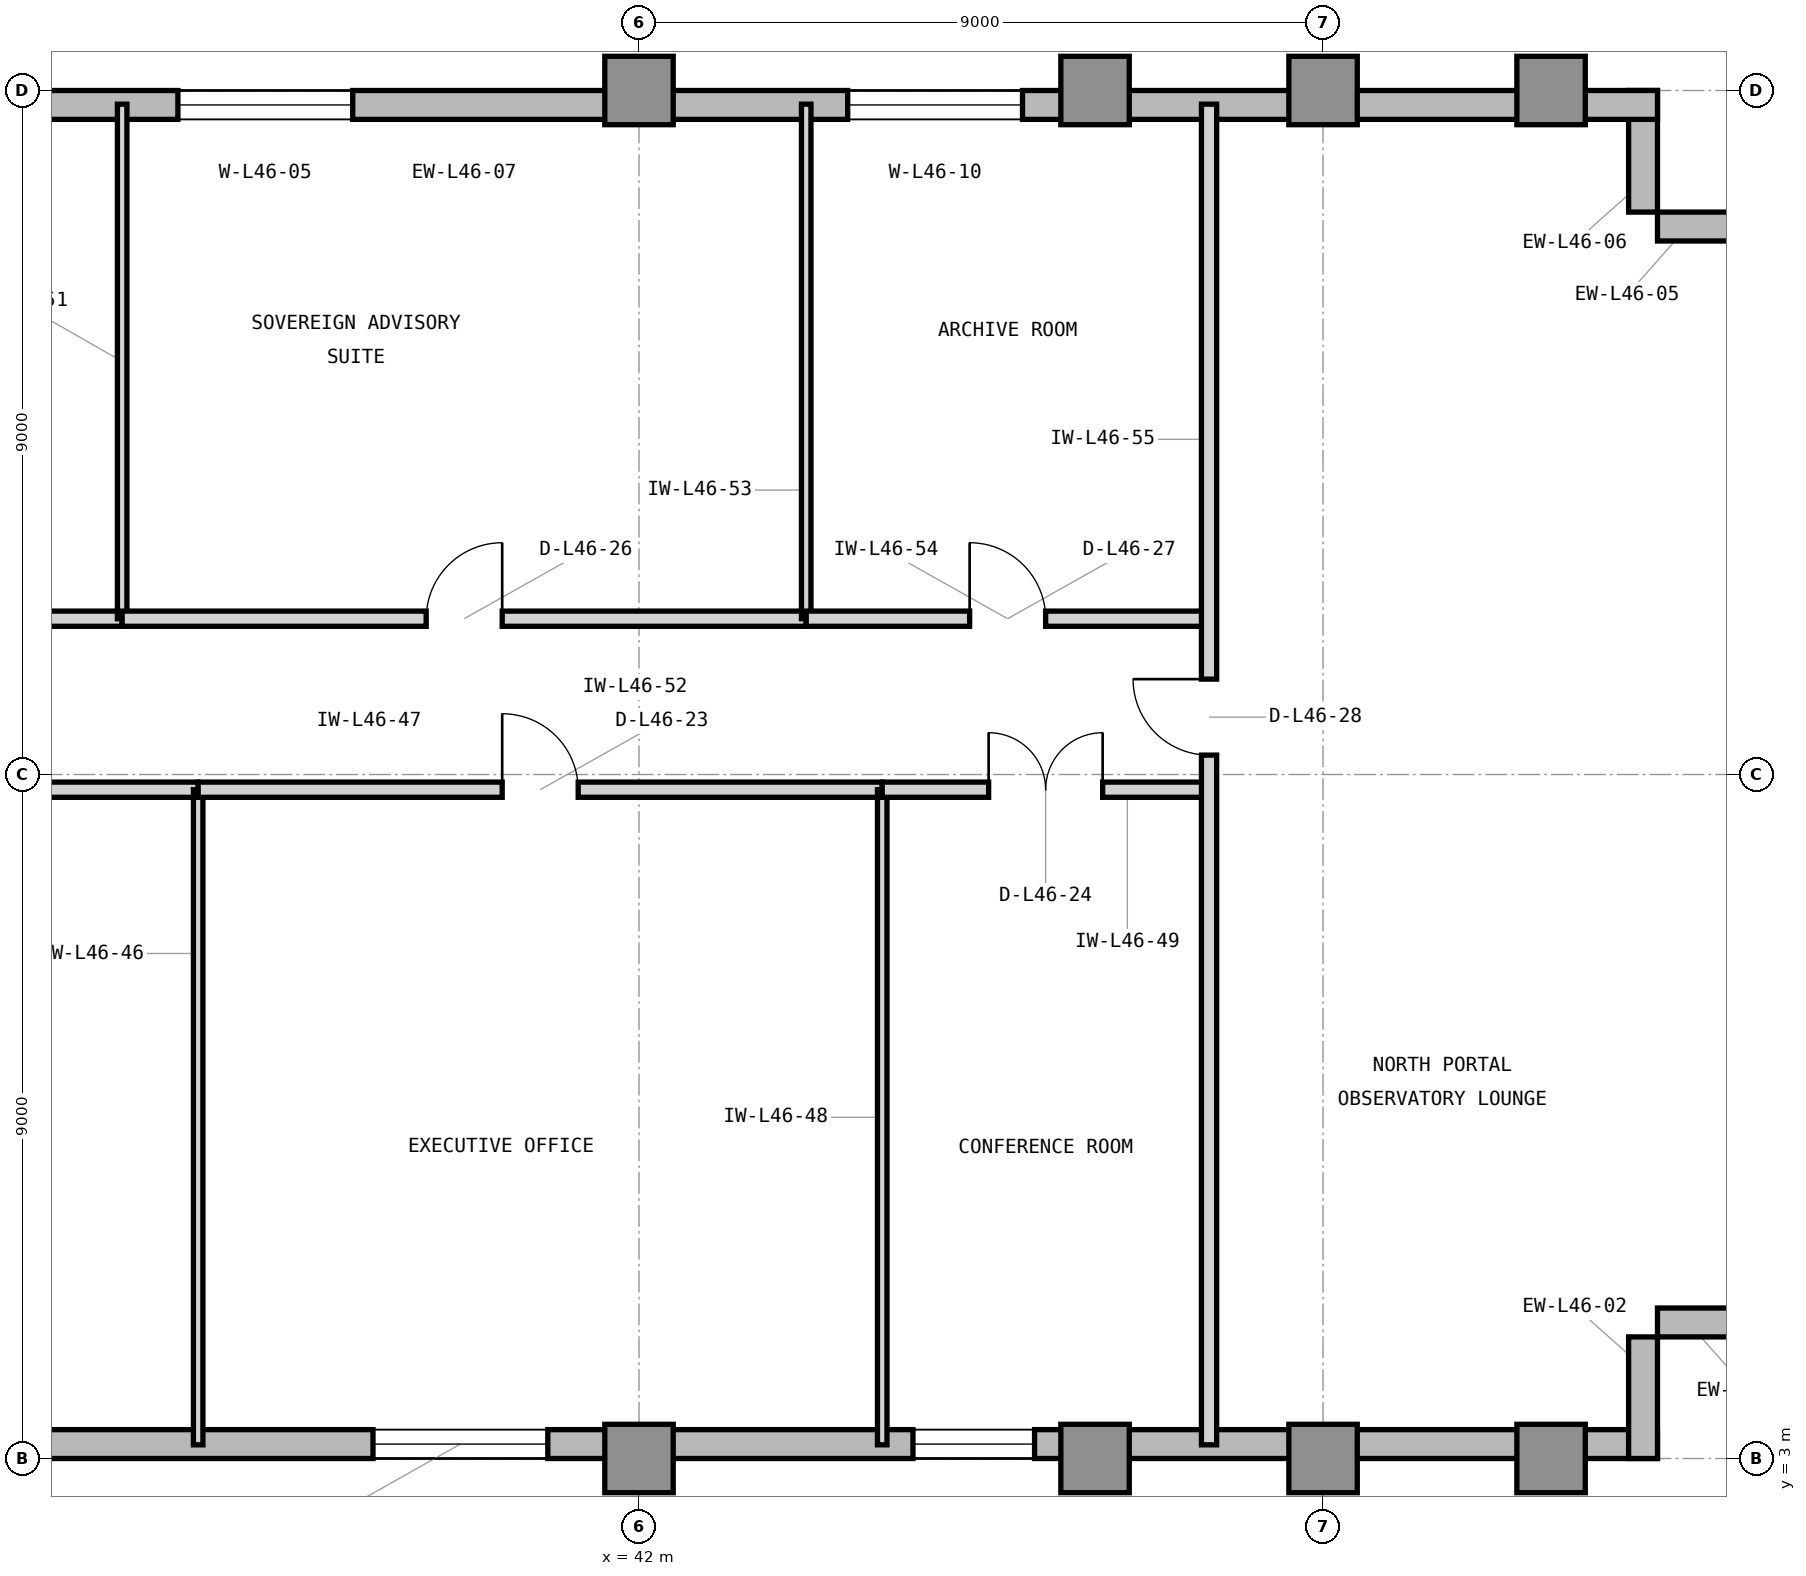
"""IFC4 building model, lengths in metres.
Left out: names, types, materials, properties, quantities, classifications, styles, units other than length and angle.
Written with IfcOpenShell. Run it as: python <this file> out.ifc"""

import sys

from ifc_helpers import new_model, si_unit, direction, frame, frame_2d, origin, origin_2d, place, context, subcontext, project, spatial, rectangle, extrude, element, fill, save


model = new_model("IFC4")
c1 = context("Model", 3, precision=1e-05, world=origin(), true_north=direction((0.0, 1.0)))
c2 = subcontext(c1, "Body", "Model", "MODEL_VIEW")
j1 = project(units=[si_unit("LENGTHUNIT", "METRE"), si_unit("PLANEANGLEUNIT", "RADIAN")], contexts=[c1])
p1 = place(None, origin())
s1 = spatial("IfcSite", under=j1, at=p1, CompositionType="ELEMENT")
p2 = place(p1, origin())
s2 = spatial("IfcBuilding", under=s1, at=p2, CompositionType="ELEMENT")
p3 = place(p2, frame((0.0, 0.0, 191.7)))
s3 = spatial("IfcBuildingStorey", under=s2, at=p3, CompositionType="ELEMENT", Elevation=191.7)
for number, where, z_axis, x_axis in (
    (1, (42.0, 3.0, 0.0), (0.0, 0.0, 1.0), (1.0, 0.0, 0.0)),
    (2, (42.0, 21.0, 0.0), (0.0, 0.0, 1.0), (1.0, 0.0, 0.0)),
    (3, (48.0, 3.0, 0.0), (0.0, 0.0, 1.0), (1.0, 0.0, 0.0)),
    (4, (48.0, 21.0, 0.0), (0.0, 0.0, 1.0), (1.0, 0.0, 0.0)),
    (5, (51.0, 3.0, 0.0), (0.0, 0.0, 1.0), (1.0, 0.0, 0.0)),
    (6, (51.0, 21.0, 0.0), (0.0, 0.0, 1.0), (1.0, 0.0, 0.0)),
    (7, (54.0, 3.0, 0.0), (0.0, 0.0, 1.0), (1.0, 0.0, 0.0)),
    (8, (54.0, 21.0, 0.0), (0.0, 0.0, 1.0), (1.0, 0.0, 0.0)),
):
    element("IfcColumn", number, at=place(p3, frame(where, z_axis=z_axis, x_axis=x_axis)), inside=s3, PredefinedType="COLUMN", context=c2, shape_type="SweptSolid", body=[
        extrude(rectangle(XDim=0.9, YDim=0.9, at=origin_2d()), origin(), (0.0, 0.0, 1.0), 3.9),
    ])
p4 = place(p3, frame((23.9, 3.19, 0.0), z_axis=(0.0, 0.0, 1.0), x_axis=(1.0, 0.0, 0.0)))
e9 = element("IfcWall", 9, at=p4, inside=s3, PredefinedType="STANDARD", context=c2, shape_type="SweptSolid", body=[
    extrude(rectangle(XDim=31.5, YDim=0.38, at=frame_2d((15.75, 0.0))), origin(), (0.0, 0.0, 1.0), 3.7),
])
p5 = place(p4, frame((5.6, 0.0, 0.9)))
e10 = element("IfcOpeningElement", 10, at=p5, cuts=e9, PredefinedType="OPENING", context=c2, shape_type="SweptSolid", body=[
    extrude(rectangle(XDim=2.3, YDim=2.2, at=frame_2d((1.15, 1.1))), frame((0.0, 0.2, 0.0), z_axis=(0.0, -1.0, 0.0), x_axis=(1.0, 0.0, 0.0)), (0.0, 0.0, 1.0), 0.4),
])
p6 = place(p4, frame((14.6, 0.0, 0.9)))
e11 = element("IfcOpeningElement", 11, at=p6, cuts=e9, PredefinedType="OPENING", context=c2, shape_type="SweptSolid", body=[
    extrude(rectangle(XDim=2.3, YDim=2.2, at=frame_2d((1.15, 1.1))), frame((0.0, 0.2, 0.0), z_axis=(0.0, -1.0, 0.0), x_axis=(1.0, 0.0, 0.0)), (0.0, 0.0, 1.0), 0.4),
])
p7 = place(p4, frame((0.9, 0.0, 0.9)))
e12 = element("IfcOpeningElement", 12, at=p7, cuts=e9, PredefinedType="OPENING", context=c2, shape_type="SweptSolid", body=[
    extrude(rectangle(XDim=1.6, YDim=2.2, at=frame_2d((0.8, 1.1))), frame((0.0, 0.2, 0.0), z_axis=(0.0, -1.0, 0.0), x_axis=(1.0, 0.0, 0.0)), (0.0, 0.0, 1.0), 0.4),
])
p8 = place(p4, frame((21.704, 0.0, 0.9)))
e13 = element("IfcOpeningElement", 13, at=p8, cuts=e9, PredefinedType="OPENING", context=c2, shape_type="SweptSolid", body=[
    extrude(rectangle(XDim=1.6, YDim=2.2, at=frame_2d((0.8, 1.1))), frame((0.0, 0.2, 0.0), z_axis=(0.0, -1.0, 0.0), x_axis=(1.0, 0.0, 0.0)), (0.0, 0.0, 1.0), 0.4),
])
for number, where, z_axis, x_axis in (
    (14, (55.21, 3.0, 0.0), (0.0, 0.0, 1.0), (0.0, 1.0, 0.0)),
    (15, (55.4, 4.79, 0.0), (0.0, 0.0, 1.0), (1.0, 0.0, 0.0)),
    (16, (57.0, 19.21, 0.0), (0.0, 0.0, 1.0), (-1.0, 0.0, 0.0)),
    (17, (55.21, 19.4, 0.0), (0.0, 0.0, 1.0), (0.0, 1.0, 0.0)),
):
    element("IfcWall", number, at=place(p3, frame(where, z_axis=z_axis, x_axis=x_axis)), inside=s3, PredefinedType="STANDARD", context=c2, shape_type="SweptSolid", body=[
        extrude(rectangle(XDim=1.6, YDim=0.38, at=frame_2d((0.8, 0.0))), origin(), (0.0, 0.0, 1.0), 3.7),
    ])
p9 = place(p3, frame((55.4, 20.81, 0.0), z_axis=(0.0, 0.0, 1.0), x_axis=(-1.0, 0.0, 0.0)))
e18 = element("IfcWall", 18, at=p9, inside=s3, PredefinedType="STANDARD", context=c2, shape_type="SweptSolid", body=[
    extrude(rectangle(XDim=31.4, YDim=0.38, at=frame_2d((15.7, 0.0))), origin(), (0.0, 0.0, 1.0), 3.7),
])
p10 = place(p9, frame((17.167, 0.0, 0.9)))
e19 = element("IfcOpeningElement", 19, at=p10, cuts=e18, PredefinedType="OPENING", context=c2, shape_type="SweptSolid", body=[
    extrude(rectangle(XDim=2.3, YDim=2.2, at=frame_2d((1.15, 1.1))), frame((0.0, 0.2, 0.0), z_axis=(0.0, -1.0, 0.0), x_axis=(1.0, 0.0, 0.0)), (0.0, 0.0, 1.0), 0.4),
])
p11 = place(p9, frame((29.034, 0.0, 0.9)))
e20 = element("IfcOpeningElement", 20, at=p11, cuts=e18, PredefinedType="OPENING", context=c2, shape_type="SweptSolid", body=[
    extrude(rectangle(XDim=1.6, YDim=2.2, at=frame_2d((0.8, 1.1))), frame((0.0, 0.2, 0.0), z_axis=(0.0, -1.0, 0.0), x_axis=(1.0, 0.0, 0.0)), (0.0, 0.0, 1.0), 0.4),
])
p12 = place(p9, frame((8.354, 0.0, 0.9)))
e21 = element("IfcOpeningElement", 21, at=p12, cuts=e18, PredefinedType="OPENING", context=c2, shape_type="SweptSolid", body=[
    extrude(rectangle(XDim=2.3, YDim=2.2, at=frame_2d((1.15, 1.1))), frame((0.0, 0.2, 0.0), z_axis=(0.0, -1.0, 0.0), x_axis=(1.0, 0.0, 0.0)), (0.0, 0.0, 1.0), 0.4),
])
p13 = place(p3, frame((26.7, 11.8, 0.0), z_axis=(0.0, 0.0, 1.0), x_axis=(1.0, 0.0, 0.0)))
e22 = element("IfcWall", 22, at=p13, inside=s3, PredefinedType="PARTITIONING", context=c2, shape_type="SweptSolid", body=[
    extrude(rectangle(XDim=9.5, YDim=0.2, at=frame_2d((4.75, 0.0))), origin(), (0.0, 0.0, 1.0), 3.69),
])
p14 = place(p13, frame((4.25, 0.0, 0.0)))
e23 = element("IfcOpeningElement", 23, at=p14, cuts=e22, PredefinedType="OPENING", context=c2, shape_type="SweptSolid", body=[
    extrude(rectangle(XDim=1.0, YDim=2.15, at=frame_2d((0.5, 1.075))), frame((0.0, 0.11, 0.0), z_axis=(0.0, -1.0, 0.0), x_axis=(1.0, 0.0, 0.0)), (0.0, 0.0, 1.0), 0.22),
])
p15 = place(p3, frame((36.2, 3.18, 0.0), z_axis=(0.0, 0.0, 1.0), x_axis=(0.0, 1.0, 0.0)))
e24 = element("IfcWall", 24, at=p15, inside=s3, PredefinedType="PARTITIONING", context=c2, shape_type="SweptSolid", body=[
    extrude(rectangle(XDim=8.62, YDim=0.125, at=frame_2d((4.31, 0.0))), origin(), (0.0, 0.0, 1.0), 3.69),
])
p16 = place(p3, frame((36.2, 11.8, 0.0), z_axis=(0.0, 0.0, 1.0), x_axis=(1.0, 0.0, 0.0)))
e25 = element("IfcWall", 25, at=p16, inside=s3, PredefinedType="PARTITIONING", context=c2, shape_type="SweptSolid", body=[
    extrude(rectangle(XDim=9.0, YDim=0.2, at=frame_2d((4.5, 0.0))), origin(), (0.0, 0.0, 1.0), 3.69),
])
p17 = place(p16, frame((4.0, 0.0, 0.0)))
e26 = element("IfcOpeningElement", 26, at=p17, cuts=e25, PredefinedType="OPENING", context=c2, shape_type="SweptSolid", body=[
    extrude(rectangle(XDim=1.0, YDim=2.15, at=frame_2d((0.5, 1.075))), frame((0.0, 0.11, 0.0), z_axis=(0.0, -1.0, 0.0), x_axis=(1.0, 0.0, 0.0)), (0.0, 0.0, 1.0), 0.22),
])
p18 = place(p3, frame((45.2, 3.18, 0.0), z_axis=(0.0, 0.0, 1.0), x_axis=(0.0, 1.0, 0.0)))
e27 = element("IfcWall", 27, at=p18, inside=s3, PredefinedType="PARTITIONING", context=c2, shape_type="SweptSolid", body=[
    extrude(rectangle(XDim=8.62, YDim=0.125, at=frame_2d((4.31, 0.0))), origin(), (0.0, 0.0, 1.0), 3.69),
])
p19 = place(p3, frame((45.2, 11.8, 0.0), z_axis=(0.0, 0.0, 1.0), x_axis=(1.0, 0.0, 0.0)))
e28 = element("IfcWall", 28, at=p19, inside=s3, PredefinedType="PARTITIONING", context=c2, shape_type="SweptSolid", body=[
    extrude(rectangle(XDim=4.3, YDim=0.2, at=frame_2d((2.15, 0.0))), origin(), (0.0, 0.0, 1.0), 3.69),
])
p20 = place(p19, frame((1.4, 0.0, 0.0)))
e29 = element("IfcOpeningElement", 29, at=p20, cuts=e28, PredefinedType="OPENING", context=c2, shape_type="SweptSolid", body=[
    extrude(rectangle(XDim=1.5, YDim=2.3, at=frame_2d((0.75, 1.15))), frame((0.0, 0.11, 0.0), z_axis=(0.0, -1.0, 0.0), x_axis=(1.0, 0.0, 0.0)), (0.0, 0.0, 1.0), 0.22),
])
p21 = place(p3, frame((26.7, 14.05, 0.0), z_axis=(0.0, 0.0, 1.0), x_axis=(1.0, 0.0, 0.0)))
e30 = element("IfcWall", 30, at=p21, inside=s3, PredefinedType="PARTITIONING", context=c2, shape_type="SweptSolid", body=[
    extrude(rectangle(XDim=8.5, YDim=0.2, at=frame_2d((4.25, 0.0))), origin(), (0.0, 0.0, 1.0), 3.69),
])
p22 = place(p21, frame((3.5, 0.0, 0.0)))
e31 = element("IfcOpeningElement", 31, at=p22, cuts=e30, PredefinedType="OPENING", context=c2, shape_type="SweptSolid", body=[
    extrude(rectangle(XDim=1.5, YDim=2.3, at=frame_2d((0.75, 1.15))), frame((0.0, 0.11, 0.0), z_axis=(0.0, -1.0, 0.0), x_axis=(1.0, 0.0, 0.0)), (0.0, 0.0, 1.0), 0.22),
])
p23 = place(p3, frame((35.2, 14.05, 0.0), z_axis=(0.0, 0.0, 1.0), x_axis=(0.0, 1.0, 0.0)))
e32 = element("IfcWall", 32, at=p23, inside=s3, PredefinedType="PARTITIONING", context=c2, shape_type="SweptSolid", body=[
    extrude(rectangle(XDim=6.77, YDim=0.125, at=frame_2d((3.385, 0.0))), origin(), (0.0, 0.0, 1.0), 3.69),
])
p24 = place(p3, frame((35.2, 14.05, 0.0), z_axis=(0.0, 0.0, 1.0), x_axis=(1.0, 0.0, 0.0)))
e33 = element("IfcWall", 33, at=p24, inside=s3, PredefinedType="PARTITIONING", context=c2, shape_type="SweptSolid", body=[
    extrude(rectangle(XDim=9.0, YDim=0.2, at=frame_2d((4.5, 0.0))), origin(), (0.0, 0.0, 1.0), 3.69),
])
p25 = place(p24, frame((4.0, 0.0, 0.0)))
e34 = element("IfcOpeningElement", 34, at=p25, cuts=e33, PredefinedType="OPENING", context=c2, shape_type="SweptSolid", body=[
    extrude(rectangle(XDim=1.0, YDim=2.15, at=frame_2d((0.5, 1.075))), frame((0.0, 0.11, 0.0), z_axis=(0.0, -1.0, 0.0), x_axis=(1.0, 0.0, 0.0)), (0.0, 0.0, 1.0), 0.22),
])
p26 = place(p3, frame((44.2, 14.05, 0.0), z_axis=(0.0, 0.0, 1.0), x_axis=(0.0, 1.0, 0.0)))
e35 = element("IfcWall", 35, at=p26, inside=s3, PredefinedType="PARTITIONING", context=c2, shape_type="SweptSolid", body=[
    extrude(rectangle(XDim=6.77, YDim=0.125, at=frame_2d((3.385, 0.0))), origin(), (0.0, 0.0, 1.0), 3.69),
])
p27 = place(p3, frame((44.2, 14.05, 0.0), z_axis=(0.0, 0.0, 1.0), x_axis=(1.0, 0.0, 0.0)))
e36 = element("IfcWall", 36, at=p27, inside=s3, PredefinedType="PARTITIONING", context=c2, shape_type="SweptSolid", body=[
    extrude(rectangle(XDim=5.3, YDim=0.2, at=frame_2d((2.65, 0.0))), origin(), (0.0, 0.0, 1.0), 3.69),
])
p28 = place(p27, frame((2.15, 0.0, 0.0)))
e37 = element("IfcOpeningElement", 37, at=p28, cuts=e36, PredefinedType="OPENING", context=c2, shape_type="SweptSolid", body=[
    extrude(rectangle(XDim=1.0, YDim=2.15, at=frame_2d((0.5, 1.075))), frame((0.0, 0.11, 0.0), z_axis=(0.0, -1.0, 0.0), x_axis=(1.0, 0.0, 0.0)), (0.0, 0.0, 1.0), 0.22),
])
p29 = place(p3, frame((49.5, 3.18, 0.0), z_axis=(0.0, 0.0, 1.0), x_axis=(0.0, 1.0, 0.0)))
e38 = element("IfcWall", 38, at=p29, inside=s3, PredefinedType="PARTITIONING", context=c2, shape_type="SweptSolid", body=[
    extrude(rectangle(XDim=17.64, YDim=0.2, at=frame_2d((8.82, 0.0))), origin(), (0.0, 0.0, 1.0), 3.69),
])
p30 = place(p29, frame((9.075, 0.0, 0.0)))
e39 = element("IfcOpeningElement", 39, at=p30, cuts=e38, PredefinedType="OPENING", context=c2, shape_type="SweptSolid", body=[
    extrude(rectangle(XDim=1.0, YDim=2.15, at=frame_2d((0.5, 1.075))), frame((0.0, 0.11, 0.0), z_axis=(0.0, -1.0, 0.0), x_axis=(1.0, 0.0, 0.0)), (0.0, 0.0, 1.0), 0.22),
])
p31 = place(p6, origin())
e40 = element("IfcWindow", 40, at=p31, inside=s3, PartitioningType="SINGLE_PANEL", PredefinedType="WINDOW", context=c2, shape_type="SweptSolid", body=[
    extrude(rectangle(XDim=2.3, YDim=2.2, at=frame_2d((1.15, 1.1))), frame((0.0, 0.11, 0.0), z_axis=(0.0, -1.0, 0.0), x_axis=(1.0, 0.0, 0.0)), (0.0, 0.0, 1.0), 0.06),
])
fill(e11, e40)
p32 = place(p10, origin())
e41 = element("IfcWindow", 41, at=p32, inside=s3, PartitioningType="SINGLE_PANEL", PredefinedType="WINDOW", context=c2, shape_type="SweptSolid", body=[
    extrude(rectangle(XDim=2.3, YDim=2.2, at=frame_2d((1.15, 1.1))), frame((0.0, 0.11, 0.0), z_axis=(0.0, -1.0, 0.0), x_axis=(1.0, 0.0, 0.0)), (0.0, 0.0, 1.0), 0.06),
])
fill(e19, e41)
p33 = place(p17, origin())
e42 = element("IfcDoor", 42, at=p33, inside=s3, OperationType="SINGLE_SWING_LEFT", PredefinedType="DOOR", context=c2, shape_type="SweptSolid", body=[
    extrude(rectangle(XDim=1.0, YDim=2.15, at=frame_2d((0.5, 1.075))), frame((0.0, 0.025, 0.0), z_axis=(0.0, -1.0, 0.0), x_axis=(1.0, 0.0, 0.0)), (0.0, 0.0, 1.0), 0.05),
])
fill(e26, e42)
p34 = place(p20, origin())
e43 = element("IfcDoor", 43, at=p34, inside=s3, OperationType="DOUBLE_DOOR_SINGLE_SWING", PredefinedType="DOOR", context=c2, shape_type="SweptSolid", body=[
    extrude(rectangle(XDim=1.5, YDim=2.3, at=frame_2d((0.75, 1.15))), frame((0.0, 0.025, 0.0), z_axis=(0.0, -1.0, 0.0), x_axis=(1.0, 0.0, 0.0)), (0.0, 0.0, 1.0), 0.05),
])
fill(e29, e43)
p35 = place(p25, origin())
e44 = element("IfcDoor", 44, at=p35, inside=s3, OperationType="SINGLE_SWING_RIGHT", PredefinedType="DOOR", context=c2, shape_type="SweptSolid", body=[
    extrude(rectangle(XDim=1.0, YDim=2.15, at=frame_2d((0.5, 1.075))), frame((0.0, 0.025, 0.0), z_axis=(0.0, -1.0, 0.0), x_axis=(1.0, 0.0, 0.0)), (0.0, 0.0, 1.0), 0.05),
])
fill(e34, e44)
p36 = place(p28, origin())
e45 = element("IfcDoor", 45, at=p36, inside=s3, OperationType="SINGLE_SWING_LEFT", PredefinedType="DOOR", context=c2, shape_type="SweptSolid", body=[
    extrude(rectangle(XDim=1.0, YDim=2.15, at=frame_2d((0.5, 1.075))), frame((0.0, 0.025, 0.0), z_axis=(0.0, -1.0, 0.0), x_axis=(1.0, 0.0, 0.0)), (0.0, 0.0, 1.0), 0.05),
])
fill(e37, e45)
p37 = place(p30, origin())
e46 = element("IfcDoor", 46, at=p37, inside=s3, OperationType="SINGLE_SWING_RIGHT", PredefinedType="DOOR", context=c2, shape_type="SweptSolid", body=[
    extrude(rectangle(XDim=1.0, YDim=2.15, at=frame_2d((0.5, 1.075))), frame((0.0, 0.025, 0.0), z_axis=(0.0, -1.0, 0.0), x_axis=(1.0, 0.0, 0.0)), (0.0, 0.0, 1.0), 0.05),
])
fill(e39, e46)
p38 = place(p8, origin())
e47 = element("IfcWindow", 47, at=p38, inside=s3, PartitioningType="SINGLE_PANEL", PredefinedType="WINDOW", context=c2, shape_type="SweptSolid", body=[
    extrude(rectangle(XDim=1.6, YDim=2.2, at=frame_2d((0.8, 1.1))), frame((0.0, 0.11, 0.0), z_axis=(0.0, -1.0, 0.0), x_axis=(1.0, 0.0, 0.0)), (0.0, 0.0, 1.0), 0.06),
])
fill(e13, e47)
p39 = place(p12, origin())
e48 = element("IfcWindow", 48, at=p39, inside=s3, PartitioningType="SINGLE_PANEL", PredefinedType="WINDOW", context=c2, shape_type="SweptSolid", body=[
    extrude(rectangle(XDim=2.3, YDim=2.2, at=frame_2d((1.15, 1.1))), frame((0.0, 0.11, 0.0), z_axis=(0.0, -1.0, 0.0), x_axis=(1.0, 0.0, 0.0)), (0.0, 0.0, 1.0), 0.06),
])
fill(e21, e48)
save(model, sys.argv[1])
